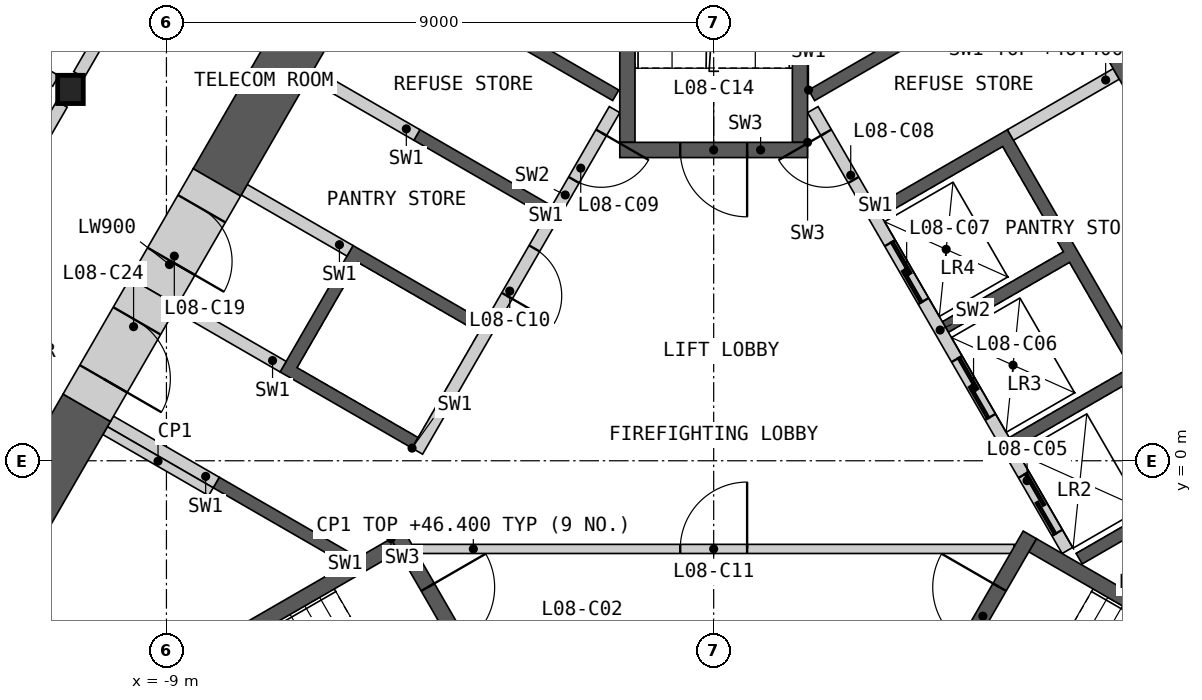
"""IFC4 building model, lengths in metres.
Left out: names, types, materials, properties, quantities, classifications, styles, units other than length and angle.
Written with IfcOpenShell. Run it as: python <this file> out.ifc"""

import sys

from ifc_helpers import new_model, si_unit, direction, frame, frame_2d, origin, origin_2d, place, context, subcontext, project, spatial, polyline, rectangle, i_section, outline, extrude, element, fill, save


model = new_model("IFC4")
c1 = context("Model", 3, precision=1e-05, world=origin(), true_north=direction((0.0, 1.0)))
c2 = subcontext(c1, "Body", "Model", "MODEL_VIEW")
j1 = project(units=[si_unit("LENGTHUNIT", "METRE"), si_unit("PLANEANGLEUNIT", "RADIAN")], contexts=[c1])
p1 = place(None, origin())
s1 = spatial("IfcSite", under=j1, at=p1, CompositionType="ELEMENT")
p2 = place(p1, origin())
s2 = spatial("IfcBuilding", under=s1, at=p2, CompositionType="ELEMENT")
p3 = place(p2, frame((0.0, 0.0, 42.6)))
s3 = spatial("IfcBuildingStorey", under=s2, at=p3, CompositionType="ELEMENT", Elevation=42.6)
p4 = place(p3, frame((-10.578, 6.107, 0.0), z_axis=(0.0, 0.0, 1.0), x_axis=(1.0, 0.0, 0.0)))
e1 = element("IfcColumn", 1, at=p4, inside=s3, PredefinedType="COLUMN", context=c2, shape_type="SweptSolid", body=[
    extrude(i_section(OverallWidth=0.421, OverallDepth=0.465, WebThickness=0.045, FlangeThickness=0.072, at=origin_2d()), origin(), (0.0, 0.0, 1.0), 4.2),
])
p5 = place(p3, origin())
e2 = element("IfcWall", 2, at=p5, inside=s3, PredefinedType="SHEAR", context=c2, shape_type="SweptSolid", body=[
    extrude(outline(polyline([(1.561, 6.097), (3.731, 7.35), (3.831, 7.177), (1.66, 5.924), (1.561, 6.097)])), origin(), (0.0, 0.0, 1.0), 3.8),
])
p6 = place(p3, origin())
e3 = element("IfcWall", 3, at=p6, inside=s3, PredefinedType="SHEAR", context=c2, shape_type="SweptSolid", body=[
    extrude(outline(polyline([(2.66, 4.192), (4.831, 5.445), (8.231, -0.444), (6.061, -1.697), (5.96, -1.524), (7.952, -0.374), (6.952, 1.358), (4.96, 0.208), (4.861, 0.381), (6.852, 1.531), (5.852, 3.263), (3.861, 2.113), (3.76, 2.287), (5.752, 3.437), (4.752, 5.169), (2.76, 4.019), (2.66, 4.192)])), origin(), (0.0, 0.0, 1.0), 3.8),
])
p7 = place(p3, frame((5.817, -1.476, 0.0), z_axis=(0.0, 0.0, 1.0), x_axis=(-0.500002616675, 0.866023893041, 0.0)))
e4 = element("IfcWall", 4, at=p7, inside=s3, PredefinedType="SOLIDWALL", context=c2, shape_type="SweptSolid", body=[
    extrude(rectangle(XDim=8.373, YDim=0.2, at=frame_2d((4.187, 0.0))), origin(), (0.0, 0.0, 1.0), 3.8),
])
p8 = place(p7, frame((0.337, 0.0, 0.0)))
e5 = element("IfcOpeningElement", 5, at=p8, cuts=e4, PredefinedType="OPENING", context=c2, shape_type="SweptSolid", body=[
    extrude(rectangle(XDim=1.1, YDim=2.1, at=frame_2d((0.55, 1.05))), frame((0.0, 0.11, 0.0), z_axis=(0.0, -1.0, 0.0), x_axis=(1.0, 0.0, 0.0)), (0.0, 0.0, 1.0), 0.22),
])
p9 = place(p7, frame((2.537, 0.0, 0.0)))
e6 = element("IfcOpeningElement", 6, at=p9, cuts=e4, PredefinedType="OPENING", context=c2, shape_type="SweptSolid", body=[
    extrude(rectangle(XDim=1.1, YDim=2.1, at=frame_2d((0.55, 1.05))), frame((0.0, 0.11, 0.0), z_axis=(0.0, -1.0, 0.0), x_axis=(1.0, 0.0, 0.0)), (0.0, 0.0, 1.0), 0.22),
])
p10 = place(p7, frame((4.737, 0.0, 0.0)))
e7 = element("IfcOpeningElement", 7, at=p10, cuts=e4, PredefinedType="OPENING", context=c2, shape_type="SweptSolid", body=[
    extrude(rectangle(XDim=1.1, YDim=2.1, at=frame_2d((0.55, 1.05))), frame((0.0, 0.11, 0.0), z_axis=(0.0, -1.0, 0.0), x_axis=(1.0, 0.0, 0.0)), (0.0, 0.0, 1.0), 0.22),
])
p11 = place(p7, frame((7.037, 0.0, 0.0)))
e8 = element("IfcOpeningElement", 8, at=p11, cuts=e4, PredefinedType="OPENING", context=c2, shape_type="SweptSolid", body=[
    extrude(rectangle(XDim=0.9, YDim=2.1, at=frame_2d((0.45, 1.05))), frame((0.0, 0.11, 0.0), z_axis=(0.0, -1.0, 0.0), x_axis=(1.0, 0.0, 0.0)), (0.0, 0.0, 1.0), 0.22),
])
p12 = place(p3, frame((4.881, 5.358, 0.0), z_axis=(0.0, 0.0, 1.0), x_axis=(0.866035824272, 0.499981950752, 0.0)))
e9 = element("IfcWall", 9, at=p12, inside=s3, PredefinedType="SHEAR", context=c2, shape_type="SweptSolid", body=[
    extrude(rectangle(XDim=2.009, YDim=0.2, at=frame_2d((1.004, 0.0))), origin(), (0.0, 0.0, 1.0), 3.8),
])
p13 = place(p3, origin())
e10 = element("IfcWall", 10, at=p13, inside=s3, PredefinedType="SHEAR", context=c2, shape_type="SweptSolid", body=[
    extrude(outline(polyline([(-6.061, -1.697), (-8.231, -0.444), (-8.131, -0.271), (-5.96, -1.524), (-6.061, -1.697)])), origin(), (0.0, 0.0, 1.0), 3.8),
])
p14 = place(p3, origin())
e11 = element("IfcWall", 11, at=p14, inside=s3, PredefinedType="SHEAR", context=c2, shape_type="SweptSolid", body=[
    extrude(outline(polyline([(-4.96, 0.208), (-7.131, 1.461), (-5.931, 3.54), (-3.76, 2.287), (-3.861, 2.113), (-5.852, 3.263), (-6.852, 1.531), (-4.861, 0.381), (-4.96, 0.208)])), origin(), (0.0, 0.0, 1.0), 3.8),
])
p15 = place(p3, origin())
e12 = element("IfcWall", 12, at=p15, inside=s3, PredefinedType="SHEAR", context=c2, shape_type="SweptSolid", body=[
    extrude(outline(polyline([(-2.76, 4.019), (-4.931, 5.272), (-4.831, 5.445), (-2.66, 4.192), (-2.76, 4.019)])), origin(), (0.0, 0.0, 1.0), 3.8),
])
p16 = place(p3, origin())
e13 = element("IfcWall", 13, at=p16, inside=s3, PredefinedType="SHEAR", context=c2, shape_type="SweptSolid", body=[
    extrude(outline(polyline([(-3.731, 7.35), (-1.561, 6.097), (-1.66, 5.924), (-3.831, 7.177), (-3.731, 7.35)])), origin(), (0.0, 0.0, 1.0), 3.8),
])
p17 = place(p3, frame((-1.631, 5.776, 0.0), z_axis=(0.0, 0.0, 1.0), x_axis=(-0.499992876559, -0.866029516466, 0.0)))
e14 = element("IfcWall", 14, at=p17, inside=s3, PredefinedType="SOLIDWALL", context=c2, shape_type="SweptSolid", body=[
    extrude(rectangle(XDim=6.486, YDim=0.2, at=frame_2d((3.243, 0.0))), origin(), (0.0, 0.0, 1.0), 3.8),
])
p18 = place(p17, frame((0.437, 0.0, 0.0)))
e15 = element("IfcOpeningElement", 15, at=p18, cuts=e14, PredefinedType="OPENING", context=c2, shape_type="SweptSolid", body=[
    extrude(rectangle(XDim=0.9, YDim=2.1, at=frame_2d((0.45, 1.05))), frame((0.0, 0.11, 0.0), z_axis=(0.0, -1.0, 0.0), x_axis=(1.0, 0.0, 0.0)), (0.0, 0.0, 1.0), 0.22),
])
p19 = place(p17, frame((2.637, 0.0, 0.0)))
e16 = element("IfcOpeningElement", 16, at=p19, cuts=e14, PredefinedType="OPENING", context=c2, shape_type="SweptSolid", body=[
    extrude(rectangle(XDim=0.9, YDim=2.1, at=frame_2d((0.45, 1.05))), frame((0.0, 0.11, 0.0), z_axis=(0.0, -1.0, 0.0), x_axis=(1.0, 0.0, 0.0)), (0.0, 0.0, 1.0), 0.22),
])
p20 = place(p3, frame((-4.881, 5.358, 0.0), z_axis=(0.0, 0.0, 1.0), x_axis=(-0.866035824272, 0.499981950752, 0.0)))
e17 = element("IfcWall", 17, at=p20, inside=s3, PredefinedType="SHEAR", context=c2, shape_type="SweptSolid", body=[
    extrude(rectangle(XDim=2.009, YDim=0.2, at=frame_2d((1.004, 0.0))), origin(), (0.0, 0.0, 1.0), 3.8),
])
p21 = place(p3, frame((-5.981, 3.453, 0.0), z_axis=(0.0, 0.0, 1.0), x_axis=(-0.866013584312, 0.500020471368, 0.0)))
e18 = element("IfcWall", 18, at=p21, inside=s3, PredefinedType="SHEAR", context=c2, shape_type="SweptSolid", body=[
    extrude(rectangle(XDim=2.009, YDim=0.2, at=frame_2d((1.005, 0.0))), origin(), (0.0, 0.0, 1.0), 3.8),
])
p22 = place(p3, frame((-7.081, 1.548, 0.0), z_axis=(0.0, 0.0, 1.0), x_axis=(-0.865983199114, 0.50007309351, 0.0)))
e19 = element("IfcWall", 19, at=p22, inside=s3, PredefinedType="SHEAR", context=c2, shape_type="SweptSolid", body=[
    extrude(rectangle(XDim=2.009, YDim=0.2, at=frame_2d((1.004, 0.0))), origin(), (0.0, 0.0, 1.0), 3.8),
])
p23 = place(p3, frame((-8.181, -0.357, 0.0), z_axis=(0.0, 0.0, 1.0), x_axis=(-0.866035824272, 0.499981950752, 0.0)))
e20 = element("IfcWall", 20, at=p23, inside=s3, PredefinedType="SHEAR", context=c2, shape_type="SweptSolid", body=[
    extrude(rectangle(XDim=2.009, YDim=0.2, at=frame_2d((1.004, 0.0))), origin(), (0.0, 0.0, 1.0), 3.8),
])
p24 = place(p3, frame((-4.941, -1.45, 0.0), z_axis=(0.0, 0.0, 1.0), x_axis=(1.0, 0.0, 0.0)))
e21 = element("IfcWall", 21, at=p24, inside=s3, PredefinedType="PARTITIONING", context=c2, shape_type="SweptSolid", body=[
    extrude(rectangle(XDim=9.882, YDim=0.15, at=frame_2d((4.941, 0.0))), origin(), (0.0, 0.0, 1.0), 3.8),
])
p25 = place(p24, frame((4.391, 0.0, 0.0)))
e22 = element("IfcOpeningElement", 22, at=p25, cuts=e21, PredefinedType="OPENING", context=c2, shape_type="SweptSolid", body=[
    extrude(rectangle(XDim=1.1, YDim=2.1, at=frame_2d((0.55, 1.05))), frame((0.0, 0.085, 0.0), z_axis=(0.0, -1.0, 0.0), x_axis=(1.0, 0.0, 0.0)), (0.0, 0.0, 1.0), 0.17),
])
p26 = place(p3, origin())
e23 = element("IfcWall", 23, at=p26, inside=s3, PredefinedType="SHEAR", context=c2, shape_type="SweptSolid", body=[
    extrude(outline(polyline([(-5.307, -1.281), (-10.374, -4.206), (-10.032, -4.298), (-5.182, -1.498), (-5.307, -1.281)])), origin(), (0.0, 0.0, 1.0), 3.8),
])
p27 = place(p3, frame((-5.199, -1.219, 0.0), z_axis=(0.0, 0.0, 1.0), x_axis=(0.499982516597, -0.866035497597, 0.0)))
e24 = element("IfcWall", 24, at=p27, inside=s3, PredefinedType="SHEAR", context=c2, shape_type="SweptSolid", body=[
    extrude(rectangle(XDim=3.088, YDim=0.25, at=frame_2d((1.544, 0.0))), origin(), (0.0, 0.0, 1.0), 3.8),
])
p28 = place(p27, frame((0.994, 0.0, 0.0)))
e25 = element("IfcOpeningElement", 25, at=p28, cuts=e24, PredefinedType="OPENING", context=c2, shape_type="SweptSolid", body=[
    extrude(rectangle(XDim=1.1, YDim=2.1, at=frame_2d((0.55, 1.05))), frame((0.0, 0.135, 0.0), z_axis=(0.0, -1.0, 0.0), x_axis=(1.0, 0.0, 0.0)), (0.0, 0.0, 1.0), 0.27),
])
p29 = place(p3, origin())
e26 = element("IfcWall", 26, at=p29, inside=s3, PredefinedType="SHEAR", context=c2, shape_type="SweptSolid", body=[
    extrude(outline(polyline([(10.032, -4.298), (10.374, -4.206), (5.307, -1.281), (5.182, -1.498), (10.032, -4.298)])), origin(), (0.0, 0.0, 1.0), 3.8),
])
p30 = place(p3, frame((3.655, -3.893, 0.0), z_axis=(0.0, 0.0, 1.0), x_axis=(0.499982516597, 0.866035497597, 0.0)))
e27 = element("IfcWall", 27, at=p30, inside=s3, PredefinedType="SHEAR", context=c2, shape_type="SweptSolid", body=[
    extrude(rectangle(XDim=3.088, YDim=0.25, at=frame_2d((1.544, 0.0))), origin(), (0.0, 0.0, 1.0), 3.8),
])
p31 = place(p30, frame((0.994, 0.0, 0.0)))
e28 = element("IfcOpeningElement", 28, at=p31, cuts=e27, PredefinedType="OPENING", context=c2, shape_type="SweptSolid", body=[
    extrude(rectangle(XDim=1.1, YDim=2.1, at=frame_2d((0.55, 1.05))), frame((0.0, 0.135, 0.0), z_axis=(0.0, -1.0, 0.0), x_axis=(1.0, 0.0, 0.0)), (0.0, 0.0, 1.0), 0.27),
])
p32 = place(p3, origin())
e29 = element("IfcWall", 29, at=p32, inside=s3, PredefinedType="SHEAR", context=c2, shape_type="SweptSolid", body=[
    extrude(outline(polyline([(1.544, 5.237), (1.544, 11.087), (1.294, 10.837), (1.294, 5.237), (1.544, 5.237)])), origin(), (0.0, 0.0, 1.0), 3.8),
])
p33 = place(p3, origin())
e30 = element("IfcWall", 30, at=p33, inside=s3, PredefinedType="SHEAR", context=c2, shape_type="SweptSolid", body=[
    extrude(outline(polyline([(-1.294, 10.837), (-1.544, 11.087), (-1.544, 5.237), (-1.294, 5.237), (-1.294, 10.837)])), origin(), (0.0, 0.0, 1.0), 3.8),
])
p34 = place(p3, frame((1.544, 5.112, 0.0), z_axis=(0.0, 0.0, 1.0), x_axis=(-1.0, 0.0, 0.0)))
e31 = element("IfcWall", 31, at=p34, inside=s3, PredefinedType="SHEAR", context=c2, shape_type="SweptSolid", body=[
    extrude(rectangle(XDim=3.088, YDim=0.25, at=frame_2d((1.544, 0.0))), origin(), (0.0, 0.0, 1.0), 3.8),
])
p35 = place(p34, frame((0.994, 0.0, 0.0)))
e32 = element("IfcOpeningElement", 32, at=p35, cuts=e31, PredefinedType="OPENING", context=c2, shape_type="SweptSolid", body=[
    extrude(rectangle(XDim=1.1, YDim=2.1, at=frame_2d((0.55, 1.05))), frame((0.0, 0.135, 0.0), z_axis=(0.0, -1.0, 0.0), x_axis=(1.0, 0.0, 0.0)), (0.0, 0.0, 1.0), 0.27),
])
p36 = place(p3, frame((-8.268, -0.509, 0.0), z_axis=(0.0, 0.0, 1.0), x_axis=(-0.866035824272, 0.499981950752, 0.0)))
e33 = element("IfcWall", 33, at=p36, inside=s3, PredefinedType="PARTITIONING", context=c2, shape_type="SweptSolid", body=[
    extrude(rectangle(XDim=2.009, YDim=0.15, at=frame_2d((1.004, 0.0))), origin(), (0.0, 0.0, 1.0), 3.8),
])
p37 = place(p3, frame((7.646, 5.486, 0.0), z_axis=(0.0, 0.0, 1.0), x_axis=(-0.499978218965, 0.866037978706, 0.0)))
e34 = element("IfcWall", 34, at=p37, inside=s3, PredefinedType="SHEAR", context=c2, shape_type="SweptSolid", body=[
    extrude(rectangle(XDim=4.076, YDim=0.9, at=frame_2d((2.038, 0.0))), origin(), (0.0, 0.0, 1.0), 3.8),
])
p38 = place(p3, frame((-10.31, 0.872, 0.0), z_axis=(0.0, 0.0, 1.0), x_axis=(-0.499991697393, -0.866030197244, 0.0)))
e35 = element("IfcWall", 35, at=p38, inside=s3, PredefinedType="SHEAR", context=c2, shape_type="SweptSolid", body=[
    extrude(rectangle(XDim=11.041, YDim=0.9, at=frame_2d((5.521, 0.0))), origin(), (0.0, 0.0, 1.0), 3.8),
])
p39 = place(p3, frame((-4.466, 10.995, 0.0), z_axis=(0.0, 0.0, 1.0), x_axis=(-0.500012427149, -0.866018228848, 0.0)))
e36 = element("IfcWall", 36, at=p39, inside=s3, PredefinedType="SHEAR", context=c2, shape_type="SweptSolid", body=[
    extrude(rectangle(XDim=7.409, YDim=0.9, at=frame_2d((3.705, 0.0))), origin(), (0.0, 0.0, 1.0), 3.8),
])
p40 = place(p3, frame((-8.17, 4.579, 0.0), z_axis=(0.0, 0.0, 1.0), x_axis=(-0.499888406853, -0.866089822532, 0.0)))
e37 = element("IfcWall", 37, at=p40, inside=s3, PredefinedType="SHEAR", context=c2, shape_type="SweptSolid", body=[
    extrude(rectangle(XDim=2.08, YDim=0.9, at=frame_2d((1.04, 0.0))), origin(), (0.0, 0.0, 1.0), 3.8),
])
p41 = place(p40, frame((0.5, 0.0, 0.0)))
e38 = element("IfcOpeningElement", 38, at=p41, cuts=e37, PredefinedType="OPENING", context=c2, shape_type="SweptSolid", body=[
    extrude(rectangle(XDim=1.0, YDim=2.1, at=frame_2d((0.5, 1.05))), frame((0.0, 0.46, 0.0), z_axis=(0.0, -1.0, 0.0), x_axis=(1.0, 0.0, 0.0)), (0.0, 0.0, 1.0), 0.92),
])
p42 = place(p3, frame((-9.21, 2.777, 0.0), z_axis=(0.0, 0.0, 1.0), x_axis=(-0.500077893725, -0.86598042715, 0.0)))
e39 = element("IfcWall", 39, at=p42, inside=s3, PredefinedType="SHEAR", context=c2, shape_type="SweptSolid", body=[
    extrude(rectangle(XDim=2.2, YDim=0.9, at=frame_2d((1.1, 0.0))), origin(), (0.0, 0.0, 1.0), 3.8),
])
p43 = place(p42, frame((0.55, 0.0, 0.0)))
e40 = element("IfcOpeningElement", 40, at=p43, cuts=e39, PredefinedType="OPENING", context=c2, shape_type="SweptSolid", body=[
    extrude(rectangle(XDim=1.1, YDim=2.1, at=frame_2d((0.55, 1.05))), frame((0.0, 0.46, 0.0), z_axis=(0.0, -1.0, 0.0), x_axis=(1.0, 0.0, 0.0)), (0.0, 0.0, 1.0), 0.92),
])
p44 = place(p3, frame((-10.439, 6.35, 0.0), z_axis=(0.0, 0.0, 1.0), x_axis=(0.50001002959, 0.86601961312, 0.0)))
e41 = element("IfcWall", 41, at=p44, inside=s3, PredefinedType="PARTITIONING", context=c2, shape_type="SweptSolid", body=[
    extrude(rectangle(XDim=10.019, YDim=0.2, at=frame_2d((5.009, 0.0))), origin(), (0.0, 0.0, 1.0), 3.8),
])
p45 = place(p44, frame((4.159, 0.0, 0.0)))
e42 = element("IfcOpeningElement", 42, at=p45, cuts=e41, PredefinedType="OPENING", context=c2, shape_type="SweptSolid", body=[
    extrude(rectangle(XDim=1.0, YDim=2.1, at=frame_2d((0.5, 1.05))), frame((0.0, 0.11, 0.0), z_axis=(0.0, -1.0, 0.0), x_axis=(1.0, 0.0, 0.0)), (0.0, 0.0, 1.0), 0.22),
])
p46 = place(p3, frame((5.429, 15.026, 0.0), z_axis=(0.0, 0.0, 1.0), x_axis=(0.50001002959, -0.86601961312, 0.0)))
e43 = element("IfcWall", 43, at=p46, inside=s3, PredefinedType="PARTITIONING", context=c2, shape_type="SweptSolid", body=[
    extrude(rectangle(XDim=10.019, YDim=0.2, at=frame_2d((5.009, 0.0))), origin(), (0.0, 0.0, 1.0), 3.8),
])
p47 = place(p46, frame((4.86, 0.0, 0.0)))
e44 = element("IfcOpeningElement", 44, at=p47, cuts=e43, PredefinedType="OPENING", context=c2, shape_type="SweptSolid", body=[
    extrude(rectangle(XDim=1.0, YDim=2.1, at=frame_2d((0.5, 1.05))), frame((0.0, 0.11, 0.0), z_axis=(0.0, -1.0, 0.0), x_axis=(1.0, 0.0, 0.0)), (0.0, 0.0, 1.0), 0.22),
])
p48 = place(p3, frame((-15.728, -2.811, 0.0), z_axis=(0.0, 0.0, 1.0), x_axis=(0.49999175339, 0.866030164915, 0.0)))
e45 = element("IfcWall", 45, at=p48, inside=s3, PredefinedType="PARTITIONING", context=c2, shape_type="SweptSolid", body=[
    extrude(rectangle(XDim=10.019, YDim=0.2, at=frame_2d((5.009, 0.0))), origin(), (0.0, 0.0, 1.0), 3.8),
])
p49 = place(p48, frame((4.059, 0.0, 0.0)))
e46 = element("IfcOpeningElement", 46, at=p49, cuts=e45, PredefinedType="OPENING", context=c2, shape_type="SweptSolid", body=[
    extrude(rectangle(XDim=1.8, YDim=2.1, at=frame_2d((0.9, 1.05))), frame((0.0, 0.11, 0.0), z_axis=(0.0, -1.0, 0.0), x_axis=(1.0, 0.0, 0.0)), (0.0, 0.0, 1.0), 0.22),
])
p50 = place(p3, frame((-21.947, 12.671, 0.0), z_axis=(0.0, 0.0, 1.0), x_axis=(0.866026729935, -0.499997703033, 0.0)))
e47 = element("IfcWall", 47, at=p50, inside=s3, PredefinedType="PARTITIONING", context=c2, shape_type="SweptSolid", body=[
    extrude(rectangle(XDim=12.848, YDim=0.2, at=frame_2d((6.424, 0.0))), origin(), (0.0, 0.0, 1.0), 2.885),
])
p51 = place(p8, origin())
e48 = element("IfcDoor", 48, at=p51, inside=s3, OperationType="SLIDING_TO_LEFT", PredefinedType="DOOR", context=c2, shape_type="SweptSolid", body=[
    extrude(rectangle(XDim=1.1, YDim=2.1, at=frame_2d((0.55, 1.05))), frame((0.0, 0.025, 0.0), z_axis=(0.0, -1.0, 0.0), x_axis=(1.0, 0.0, 0.0)), (0.0, 0.0, 1.0), 0.05),
])
fill(e5, e48)
p52 = place(p9, origin())
e49 = element("IfcDoor", 49, at=p52, inside=s3, OperationType="SLIDING_TO_LEFT", PredefinedType="DOOR", context=c2, shape_type="SweptSolid", body=[
    extrude(rectangle(XDim=1.1, YDim=2.1, at=frame_2d((0.55, 1.05))), frame((0.0, 0.025, 0.0), z_axis=(0.0, -1.0, 0.0), x_axis=(1.0, 0.0, 0.0)), (0.0, 0.0, 1.0), 0.05),
])
fill(e6, e49)
p53 = place(p10, origin())
e50 = element("IfcDoor", 50, at=p53, inside=s3, OperationType="SLIDING_TO_LEFT", PredefinedType="DOOR", context=c2, shape_type="SweptSolid", body=[
    extrude(rectangle(XDim=1.1, YDim=2.1, at=frame_2d((0.55, 1.05))), frame((0.0, 0.025, 0.0), z_axis=(0.0, -1.0, 0.0), x_axis=(1.0, 0.0, 0.0)), (0.0, 0.0, 1.0), 0.05),
])
fill(e7, e50)
p54 = place(p11, origin())
e51 = element("IfcDoor", 51, at=p54, inside=s3, OperationType="SINGLE_SWING_RIGHT", PredefinedType="DOOR", context=c2, shape_type="SweptSolid", body=[
    extrude(rectangle(XDim=0.9, YDim=2.1, at=frame_2d((0.45, 1.05))), frame((0.0, 0.025, 0.0), z_axis=(0.0, -1.0, 0.0), x_axis=(1.0, 0.0, 0.0)), (0.0, 0.0, 1.0), 0.05),
])
fill(e8, e51)
p55 = place(p18, origin())
e52 = element("IfcDoor", 52, at=p55, inside=s3, OperationType="SINGLE_SWING_LEFT", PredefinedType="DOOR", context=c2, shape_type="SweptSolid", body=[
    extrude(rectangle(XDim=0.9, YDim=2.1, at=frame_2d((0.45, 1.05))), frame((0.0, 0.025, 0.0), z_axis=(0.0, -1.0, 0.0), x_axis=(1.0, 0.0, 0.0)), (0.0, 0.0, 1.0), 0.05),
])
fill(e15, e52)
p56 = place(p19, origin())
e53 = element("IfcDoor", 53, at=p56, inside=s3, OperationType="SINGLE_SWING_RIGHT", PredefinedType="DOOR", context=c2, shape_type="SweptSolid", body=[
    extrude(rectangle(XDim=0.9, YDim=2.1, at=frame_2d((0.45, 1.05))), frame((0.0, 0.025, 0.0), z_axis=(0.0, -1.0, 0.0), x_axis=(1.0, 0.0, 0.0)), (0.0, 0.0, 1.0), 0.05),
])
fill(e16, e53)
p57 = place(p25, origin())
e54 = element("IfcDoor", 54, at=p57, inside=s3, OperationType="SINGLE_SWING_RIGHT", PredefinedType="DOOR", context=c2, shape_type="SweptSolid", body=[
    extrude(rectangle(XDim=1.1, YDim=2.1, at=frame_2d((0.55, 1.05))), frame((0.0, 0.025, 0.0), z_axis=(0.0, -1.0, 0.0), x_axis=(1.0, 0.0, 0.0)), (0.0, 0.0, 1.0), 0.05),
])
fill(e22, e54)
p58 = place(p28, origin())
e55 = element("IfcDoor", 55, at=p58, inside=s3, OperationType="SINGLE_SWING_LEFT", PredefinedType="DOOR", context=c2, shape_type="SweptSolid", body=[
    extrude(rectangle(XDim=1.1, YDim=2.1, at=frame_2d((0.55, 1.05))), frame((0.0, 0.025, 0.0), z_axis=(0.0, -1.0, 0.0), x_axis=(1.0, 0.0, 0.0)), (0.0, 0.0, 1.0), 0.05),
])
fill(e25, e55)
p59 = place(p31, origin())
e56 = element("IfcDoor", 56, at=p59, inside=s3, OperationType="SINGLE_SWING_RIGHT", PredefinedType="DOOR", context=c2, shape_type="SweptSolid", body=[
    extrude(rectangle(XDim=1.1, YDim=2.1, at=frame_2d((0.55, 1.05))), frame((0.0, 0.025, 0.0), z_axis=(0.0, -1.0, 0.0), x_axis=(1.0, 0.0, 0.0)), (0.0, 0.0, 1.0), 0.05),
])
fill(e28, e56)
p60 = place(p35, origin())
e57 = element("IfcDoor", 57, at=p60, inside=s3, OperationType="SINGLE_SWING_LEFT", PredefinedType="DOOR", context=c2, shape_type="SweptSolid", body=[
    extrude(rectangle(XDim=1.1, YDim=2.1, at=frame_2d((0.55, 1.05))), frame((0.0, 0.025, 0.0), z_axis=(0.0, -1.0, 0.0), x_axis=(1.0, 0.0, 0.0)), (0.0, 0.0, 1.0), 0.05),
])
fill(e32, e57)
p61 = place(p41, origin())
e58 = element("IfcDoor", 58, at=p61, inside=s3, OperationType="SINGLE_SWING_RIGHT", PredefinedType="DOOR", context=c2, shape_type="SweptSolid", body=[
    extrude(rectangle(XDim=1.0, YDim=2.1, at=frame_2d((0.5, 1.05))), frame((0.0, 0.205, 0.0), z_axis=(0.0, -1.0, 0.0), x_axis=(1.0, 0.0, 0.0)), (0.0, 0.0, 1.0), 0.05),
])
fill(e38, e58)
p62 = place(p43, origin())
e59 = element("IfcDoor", 59, at=p62, inside=s3, OperationType="SINGLE_SWING_RIGHT", PredefinedType="DOOR", context=c2, shape_type="SweptSolid", body=[
    extrude(rectangle(XDim=1.1, YDim=2.1, at=frame_2d((0.55, 1.05))), frame((0.0, 0.205, 0.0), z_axis=(0.0, -1.0, 0.0), x_axis=(1.0, 0.0, 0.0)), (0.0, 0.0, 1.0), 0.05),
])
fill(e40, e59)
save(model, sys.argv[1])
